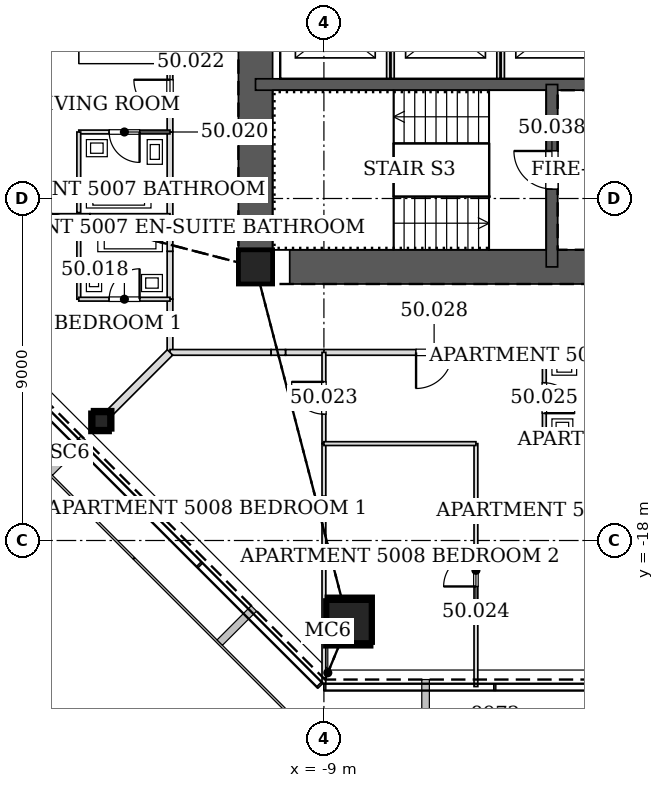
"""IFC4 building model, lengths in metres.
Left out: names, types, materials, properties, quantities, classifications, styles, units other than length and angle.
Written with IfcOpenShell. Run it as: python <this file> out.ifc"""

import sys

from ifc_helpers import new_model, si_unit, direction, frame, frame_2d, origin, origin_2d, place, context, subcontext, project, spatial, rectangle, hollow_rectangle, extrude, element, fill, save


model = new_model("IFC4")
c1 = context("Model", 3, precision=1e-05, world=origin(), true_north=direction((0.0, 1.0)))
c2 = subcontext(c1, "Body", "Model", "MODEL_VIEW")
j1 = project(units=[si_unit("LENGTHUNIT", "METRE"), si_unit("PLANEANGLEUNIT", "RADIAN")], contexts=[c1])
p1 = place(None, origin())
s1 = spatial("IfcSite", under=j1, at=p1, CompositionType="ELEMENT")
p2 = place(p1, origin())
s2 = spatial("IfcBuilding", under=s1, at=p2, CompositionType="ELEMENT")
p3 = place(p2, frame((0.0, 0.0, 217.6)))
s3 = spatial("IfcBuildingStorey", under=s2, at=p3, CompositionType="ELEMENT", Elevation=217.6)
p4 = place(p3, frame((-8.359, -20.181, 0.0), z_axis=(0.01169924247, 0.02827915051, 0.999531598986), x_axis=(-0.924045401938, 0.382282742426, 0.0)))
e1 = element("IfcColumn", 1, at=p4, inside=s3, PredefinedType="COLUMN", context=c2, shape_type="SweptSolid", body=[
    extrude(hollow_rectangle(XDim=1.2, YDim=1.2, WallThickness=0.055, at=origin_2d()), origin(), (0.0, 0.0, 1.0), 3.402),
])
p5 = place(p3, frame((-14.891, -14.891, 0.0), z_axis=(0.020026431307, 0.020026431307, 0.999598861593), x_axis=(-0.707106781187, 0.707106781187, 0.0)))
e2 = element("IfcColumn", 2, at=p5, inside=s3, PredefinedType="COLUMN", context=c2, shape_type="SweptSolid", body=[
    extrude(hollow_rectangle(XDim=0.5, YDim=0.5, WallThickness=0.025, at=origin_2d()), origin(), (0.0, 0.0, 1.0), 3.401),
])
p6 = place(p3, frame((-10.8, -10.8, 0.0), z_axis=(0.0, 0.0, 1.0), x_axis=(1.0, 0.0, 0.0)))
e3 = element("IfcColumn", 3, at=p6, inside=s3, PredefinedType="COLUMN", context=c2, shape_type="SweptSolid", body=[
    extrude(hollow_rectangle(XDim=0.9, YDim=0.9, WallThickness=0.05, at=origin_2d()), origin(), (0.0, 0.0, 1.0), 3.4),
])
p7 = place(p3, frame((-10.8, -10.8, 0.0), z_axis=(0.0, 0.0, 1.0), x_axis=(1.0, 0.0, 0.0)))
e4 = element("IfcWall", 4, at=p7, inside=s3, PredefinedType="SOLIDWALL", context=c2, shape_type="SweptSolid", body=[
    extrude(rectangle(XDim=21.6, YDim=0.9, at=frame_2d((10.8, 0.0))), origin(), (0.0, 0.0, 1.0), 3.4),
])
p8 = place(p7, frame((10.05, 0.0, 0.0)))
e5 = element("IfcOpeningElement", 5, at=p8, cuts=e4, PredefinedType="OPENING", context=c2, shape_type="SweptSolid", body=[
    extrude(rectangle(XDim=1.5, YDim=2.1, at=frame_2d((0.75, 1.05))), frame((0.0, 0.46, 0.0), z_axis=(0.0, -1.0, 0.0), x_axis=(1.0, 0.0, 0.0)), (0.0, 0.0, 1.0), 0.92),
])
p9 = place(p7, frame((17.1, 0.0, 0.0)))
e6 = element("IfcOpeningElement", 6, at=p9, cuts=e4, PredefinedType="OPENING", context=c2, shape_type="SweptSolid", body=[
    extrude(rectangle(XDim=0.9, YDim=2.1, at=frame_2d((0.45, 1.05))), frame((0.0, 0.46, 0.0), z_axis=(0.0, -1.0, 0.0), x_axis=(1.0, 0.0, 0.0)), (0.0, 0.0, 1.0), 0.92),
])
p10 = place(p3, frame((-10.8, 10.8, 0.0), z_axis=(0.0, 0.0, 1.0), x_axis=(0.0, -1.0, 0.0)))
e7 = element("IfcWall", 7, at=p10, inside=s3, PredefinedType="SOLIDWALL", context=c2, shape_type="SweptSolid", body=[
    extrude(rectangle(XDim=21.6, YDim=0.9, at=frame_2d((10.8, 0.0))), origin(), (0.0, 0.0, 1.0), 3.4),
])
p11 = place(p10, frame((8.7, 0.0, 0.0)))
e8 = element("IfcOpeningElement", 8, at=p11, cuts=e7, PredefinedType="OPENING", context=c2, shape_type="SweptSolid", body=[
    extrude(rectangle(XDim=1.2, YDim=2.1, at=frame_2d((0.6, 1.05))), frame((0.0, 0.46, 0.0), z_axis=(0.0, -1.0, 0.0), x_axis=(1.0, 0.0, 0.0)), (0.0, 0.0, 1.0), 0.92),
])
p12 = place(p10, frame((11.7, 0.0, 0.0)))
e9 = element("IfcOpeningElement", 9, at=p12, cuts=e7, PredefinedType="OPENING", context=c2, shape_type="SweptSolid", body=[
    extrude(rectangle(XDim=1.2, YDim=2.1, at=frame_2d((0.6, 1.05))), frame((0.0, 0.46, 0.0), z_axis=(0.0, -1.0, 0.0), x_axis=(1.0, 0.0, 0.0)), (0.0, 0.0, 1.0), 0.92),
])
p13 = place(p3, frame((-10.8, -6.0, 0.0), z_axis=(0.0, 0.0, 1.0), x_axis=(1.0, 0.0, 0.0)))
e10 = element("IfcWall", 10, at=p13, inside=s3, PredefinedType="SOLIDWALL", context=c2, shape_type="SweptSolid", body=[
    extrude(rectangle(XDim=21.6, YDim=0.3, at=frame_2d((10.8, 0.0))), origin(), (0.0, 0.0, 1.0), 3.4),
])
p14 = place(p13, frame((10.25, 0.0, 0.0)))
e11 = element("IfcOpeningElement", 11, at=p14, cuts=e10, PredefinedType="OPENING", context=c2, shape_type="SweptSolid", body=[
    extrude(rectangle(XDim=1.1, YDim=2.1, at=frame_2d((0.55, 1.05))), frame((0.0, 0.16, 0.0), z_axis=(0.0, -1.0, 0.0), x_axis=(1.0, 0.0, 0.0)), (0.0, 0.0, 1.0), 0.32),
])
p15 = place(p3, frame((-3.0, -6.0, 0.0), z_axis=(0.0, 0.0, 1.0), x_axis=(0.0, -1.0, 0.0)))
e12 = element("IfcWall", 12, at=p15, inside=s3, PredefinedType="SOLIDWALL", context=c2, shape_type="SweptSolid", body=[
    extrude(rectangle(XDim=4.8, YDim=0.3, at=frame_2d((2.4, 0.0))), origin(), (0.0, 0.0, 1.0), 3.4),
])
p16 = place(p15, frame((1.75, 0.0, 0.0)))
e13 = element("IfcOpeningElement", 13, at=p16, cuts=e12, PredefinedType="OPENING", context=c2, shape_type="SweptSolid", body=[
    extrude(rectangle(XDim=1.0, YDim=2.1, at=frame_2d((0.5, 1.05))), frame((0.0, 0.16, 0.0), z_axis=(0.0, -1.0, 0.0), x_axis=(1.0, 0.0, 0.0)), (0.0, 0.0, 1.0), 0.32),
])
p17 = place(p3, frame((-13.05, -9.449, 0.0), z_axis=(0.0, 0.0, 1.0), x_axis=(0.0, -1.0, 0.0)))
e14 = element("IfcWall", 14, at=p17, inside=s3, PredefinedType="PARTITIONING", context=c2, shape_type="SweptSolid", body=[
    extrude(rectangle(XDim=0.562, YDim=0.15, at=frame_2d((0.281, 0.0))), origin(), (0.0, 0.0, 1.0), 3.2),
])
p18 = place(p3, frame((-13.05, -10.389, 0.0), z_axis=(0.0, 0.0, 1.0), x_axis=(0.0, -1.0, 0.0)))
e15 = element("IfcWall", 15, at=p18, inside=s3, PredefinedType="PARTITIONING", context=c2, shape_type="SweptSolid", body=[
    extrude(rectangle(XDim=1.262, YDim=0.15, at=frame_2d((0.631, 0.0))), origin(), (0.0, 0.0, 1.0), 3.2),
])
p19 = place(p3, frame((-13.05, -10.011, 0.0), z_axis=(0.0, 0.0, 1.0), x_axis=(0.0, -1.0, 0.0)))
e16 = element("IfcWall", 16, at=p19, inside=s3, PredefinedType="PARTITIONING", context=c2, shape_type="SweptSolid", body=[
    extrude(rectangle(XDim=0.378, YDim=0.15, at=frame_2d((0.189, 0.0))), origin(), (0.0, 0.0, 1.0), 2.268),
])
p20 = place(p3, frame((-13.05, -11.649, 0.0), z_axis=(0.0, 0.0, 1.0), x_axis=(0.0, -1.0, 0.0)))
e17 = element("IfcWall", 17, at=p20, inside=s3, PredefinedType="PARTITIONING", context=c2, shape_type="SweptSolid", body=[
    extrude(rectangle(XDim=1.401, YDim=0.15, at=frame_2d((0.701, 0.0))), origin(), (0.0, 0.0, 1.0), 2.578),
])
p21 = place(p3, frame((-13.05, -7.249, 0.0), z_axis=(0.0, 0.0, 1.0), x_axis=(0.0, -1.0, 0.0)))
e18 = element("IfcWall", 18, at=p21, inside=s3, PredefinedType="PARTITIONING", context=c2, shape_type="SweptSolid", body=[
    extrude(rectangle(XDim=2.202, YDim=0.15, at=frame_2d((1.101, 0.0))), origin(), (0.0, 0.0, 1.0), 3.2),
])
p22 = place(p3, frame((-13.05, -3.649, 0.0), z_axis=(0.0, 0.0, 1.0), x_axis=(0.0, -1.0, 0.0)))
e19 = element("IfcWall", 19, at=p22, inside=s3, PredefinedType="PARTITIONING", context=c2, shape_type="SweptSolid", body=[
    extrude(rectangle(XDim=1.802, YDim=0.15, at=frame_2d((0.901, 0.0))), origin(), (0.0, 0.0, 1.0), 3.2),
])
p23 = place(p3, frame((-13.05, -5.449, 0.0), z_axis=(0.0, 0.0, 1.0), x_axis=(0.0, -1.0, 0.0)))
e20 = element("IfcWall", 20, at=p23, inside=s3, PredefinedType="PARTITIONING", context=c2, shape_type="SweptSolid", body=[
    extrude(rectangle(XDim=1.802, YDim=0.15, at=frame_2d((0.901, 0.0))), origin(), (0.0, 0.0, 1.0), 3.2),
])
p24 = place(p23, frame((0.426, 0.0, 0.0)))
e21 = element("IfcOpeningElement", 21, at=p24, cuts=e20, PredefinedType="OPENING", context=c2, shape_type="SweptSolid", body=[
    extrude(rectangle(XDim=0.95, YDim=2.1, at=frame_2d((0.475, 1.05))), frame((0.0, 0.085, 0.0), z_axis=(0.0, -1.0, 0.0), x_axis=(1.0, 0.0, 0.0)), (0.0, 0.0, 1.0), 0.17),
])
p25 = place(p3, frame((-13.05, -13.05, 0.0), z_axis=(0.0, 0.0, 1.0), x_axis=(1.0, 0.0, 0.0)))
e22 = element("IfcWall", 22, at=p25, inside=s3, PredefinedType="PARTITIONING", context=c2, shape_type="SweptSolid", body=[
    extrude(rectangle(XDim=2.661, YDim=0.15, at=frame_2d((1.331, 0.0))), origin(), (0.0, 0.0, 1.0), 2.578),
])
p26 = place(p3, frame((-10.011, -13.05, 0.0), z_axis=(0.0, 0.0, 1.0), x_axis=(1.0, 0.0, 0.0)))
e23 = element("IfcWall", 23, at=p26, inside=s3, PredefinedType="PARTITIONING", context=c2, shape_type="SweptSolid", body=[
    extrude(rectangle(XDim=1.012, YDim=0.15, at=frame_2d((0.506, 0.0))), origin(), (0.0, 0.0, 1.0), 3.2),
])
p27 = place(p3, frame((-10.389, -13.05, 0.0), z_axis=(0.0, 0.0, 1.0), x_axis=(1.0, 0.0, 0.0)))
e24 = element("IfcWall", 24, at=p27, inside=s3, PredefinedType="PARTITIONING", context=c2, shape_type="SweptSolid", body=[
    extrude(rectangle(XDim=0.378, YDim=0.15, at=frame_2d((0.189, 0.0))), origin(), (0.0, 0.0, 1.0), 2.268),
])
p28 = place(p3, frame((-3.201, -13.05, 0.0), z_axis=(0.0, 0.0, 1.0), x_axis=(1.0, 0.0, 0.0)))
e25 = element("IfcWall", 25, at=p28, inside=s3, PredefinedType="PARTITIONING", context=c2, shape_type="SweptSolid", body=[
    extrude(rectangle(XDim=2.202, YDim=0.15, at=frame_2d((1.101, 0.0))), origin(), (0.0, 0.0, 1.0), 3.2),
])
p29 = place(p3, frame((-9.001, -13.05, 0.0), z_axis=(0.0, 0.0, 1.0), x_axis=(1.0, 0.0, 0.0)))
e26 = element("IfcWall", 26, at=p29, inside=s3, PredefinedType="PARTITIONING", context=c2, shape_type="SweptSolid", body=[
    extrude(rectangle(XDim=5.802, YDim=0.15, at=frame_2d((2.901, 0.0))), origin(), (0.0, 0.0, 1.0), 3.2),
])
p30 = place(p29, frame((2.426, 0.0, 0.0)))
e27 = element("IfcOpeningElement", 27, at=p30, cuts=e26, PredefinedType="OPENING", context=c2, shape_type="SweptSolid", body=[
    extrude(rectangle(XDim=0.95, YDim=2.1, at=frame_2d((0.475, 1.05))), frame((0.0, 0.085, 0.0), z_axis=(0.0, -1.0, 0.0), x_axis=(1.0, 0.0, 0.0)), (0.0, 0.0, 1.0), 0.17),
])
p31 = place(p3, frame((-15.45, -9.748, 0.0), z_axis=(0.0, 0.0, 1.0), x_axis=(0.0, -1.0, 0.0)))
e28 = element("IfcWall", 28, at=p31, inside=s3, PredefinedType="PARTITIONING", context=c2, shape_type="SweptSolid", body=[
    extrude(rectangle(XDim=1.902, YDim=0.1, at=frame_2d((0.951, 0.0))), origin(), (0.0, 0.0, 1.0), 2.786),
])
p32 = place(p3, frame((-15.45, -9.45, 0.0), z_axis=(0.0, 0.0, 1.0), x_axis=(0.0, -1.0, 0.0)))
e29 = element("IfcWall", 29, at=p32, inside=s3, PredefinedType="PARTITIONING", context=c2, shape_type="SweptSolid", body=[
    extrude(rectangle(XDim=0.298, YDim=0.1, at=frame_2d((0.149, 0.0))), origin(), (0.0, 0.0, 1.0), 2.268),
])
p33 = place(p3, frame((-15.45, -11.65, 0.0), z_axis=(0.0, 0.0, 1.0), x_axis=(1.0, 0.0, 0.0)))
e30 = element("IfcWall", 30, at=p33, inside=s3, PredefinedType="PARTITIONING", context=c2, shape_type="SweptSolid", body=[
    extrude(rectangle(XDim=2.4, YDim=0.1, at=frame_2d((1.2, 0.0))), origin(), (0.0, 0.0, 1.0), 2.786),
])
p34 = place(p33, frame((0.8, 0.0, 0.0)))
e31 = element("IfcOpeningElement", 31, at=p34, cuts=e30, PredefinedType="OPENING", context=c2, shape_type="SweptSolid", body=[
    extrude(rectangle(XDim=0.8, YDim=2.1, at=frame_2d((0.4, 1.05))), frame((0.0, 0.06, 0.0), z_axis=(0.0, -1.0, 0.0), x_axis=(1.0, 0.0, 0.0)), (0.0, 0.0, 1.0), 0.12),
])
p35 = place(p3, frame((-13.05, -9.45, 0.0), z_axis=(0.0, 0.0, 1.0), x_axis=(-1.0, 0.0, 0.0)))
e32 = element("IfcWall", 32, at=p35, inside=s3, PredefinedType="PARTITIONING", context=c2, shape_type="SweptSolid", body=[
    extrude(rectangle(XDim=2.103, YDim=0.1, at=frame_2d((1.052, 0.0))), origin(), (0.0, 0.0, 1.0), 2.591),
])
p36 = place(p3, frame((-15.153, -9.45, 0.0), z_axis=(0.0, 0.0, 1.0), x_axis=(-1.0, 0.0, 0.0)))
e33 = element("IfcWall", 33, at=p36, inside=s3, PredefinedType="PARTITIONING", context=c2, shape_type="SweptSolid", body=[
    extrude(rectangle(XDim=1.415, YDim=0.1, at=frame_2d((0.708, 0.0))), origin(), (0.0, 0.0, 1.0), 2.268),
])
p37 = place(p3, frame((-14.633, -14.633, 0.0), z_axis=(0.0, 0.0, 1.0), x_axis=(0.707106781187, 0.707106781187, 0.0)))
e34 = element("IfcWall", 34, at=p37, inside=s3, PredefinedType="PARTITIONING", context=c2, shape_type="SweptSolid", body=[
    extrude(rectangle(XDim=2.238, YDim=0.2, at=frame_2d((1.119, 0.0))), origin(), (0.0, 0.0, 1.0), 2.578),
])
p38 = place(p3, frame((-13.05, -7.25, 0.0), z_axis=(0.0, 0.0, 1.0), x_axis=(-1.0, 0.0, 0.0)))
e35 = element("IfcWall", 35, at=p38, inside=s3, PredefinedType="PARTITIONING", context=c2, shape_type="SweptSolid", body=[
    extrude(rectangle(XDim=2.4, YDim=0.1, at=frame_2d((1.2, 0.0))), origin(), (0.0, 0.0, 1.0), 2.591),
])
p39 = place(p38, frame((0.8, 0.0, 0.0)))
e36 = element("IfcOpeningElement", 36, at=p39, cuts=e35, PredefinedType="OPENING", context=c2, shape_type="SweptSolid", body=[
    extrude(rectangle(XDim=0.8, YDim=2.1, at=frame_2d((0.4, 1.05))), frame((0.0, 0.06, 0.0), z_axis=(0.0, -1.0, 0.0), x_axis=(1.0, 0.0, 0.0)), (0.0, 0.0, 1.0), 0.12),
])
p40 = place(p3, frame((-15.45, -7.25, 0.0), z_axis=(0.0, 0.0, 1.0), x_axis=(0.0, -1.0, 0.0)))
e37 = element("IfcWall", 37, at=p40, inside=s3, PredefinedType="PARTITIONING", context=c2, shape_type="SweptSolid", body=[
    extrude(rectangle(XDim=2.121, YDim=0.1, at=frame_2d((1.061, 0.0))), origin(), (0.0, 0.0, 1.0), 3.2),
])
p41 = place(p3, frame((-9.0, -21.764, 0.0), z_axis=(0.0, 0.0, 1.0), x_axis=(0.0, 1.0, 0.0)))
e38 = element("IfcWall", 38, at=p41, inside=s3, PredefinedType="PARTITIONING", context=c2, shape_type="SweptSolid", body=[
    extrude(rectangle(XDim=1.178, YDim=0.1, at=frame_2d((0.589, 0.0))), origin(), (0.0, 0.0, 1.0), 3.2),
])
p42 = place(p3, frame((-9.0, -20.11, 0.0), z_axis=(0.0, 0.0, 1.0), x_axis=(0.0, 1.0, 0.0)))
e39 = element("IfcWall", 39, at=p42, inside=s3, PredefinedType="PARTITIONING", context=c2, shape_type="SweptSolid", body=[
    extrude(rectangle(XDim=1.855, YDim=0.1, at=frame_2d((0.927, 0.0))), origin(), (0.0, 0.0, 1.0), 2.783),
])
p43 = place(p3, frame((-9.0, -16.84, 0.0), z_axis=(0.0, 0.0, 1.0), x_axis=(0.0, 1.0, 0.0)))
e40 = element("IfcWall", 40, at=p43, inside=s3, PredefinedType="PARTITIONING", context=c2, shape_type="SweptSolid", body=[
    extrude(rectangle(XDim=1.391, YDim=0.1, at=frame_2d((0.696, 0.0))), origin(), (0.0, 0.0, 1.0), 2.664),
])
p44 = place(p3, frame((-9.0, -18.255, 0.0), z_axis=(0.0, 0.0, 1.0), x_axis=(0.0, 1.0, 0.0)))
e41 = element("IfcWall", 41, at=p44, inside=s3, PredefinedType="PARTITIONING", context=c2, shape_type="SweptSolid", body=[
    extrude(rectangle(XDim=1.415, YDim=0.1, at=frame_2d((0.708, 0.0))), origin(), (0.0, 0.0, 1.0), 2.268),
])
p45 = place(p3, frame((-9.0, -15.451, 0.0), z_axis=(0.0, 0.0, 1.0), x_axis=(0.0, 1.0, 0.0)))
e42 = element("IfcWall", 42, at=p45, inside=s3, PredefinedType="PARTITIONING", context=c2, shape_type="SweptSolid", body=[
    extrude(rectangle(XDim=2.401, YDim=0.1, at=frame_2d((1.2, 0.0))), origin(), (0.0, 0.0, 1.0), 2.591),
])
p46 = place(p45, frame((0.775, 0.0, 0.0)))
e43 = element("IfcOpeningElement", 43, at=p46, cuts=e42, PredefinedType="OPENING", context=c2, shape_type="SweptSolid", body=[
    extrude(rectangle(XDim=0.85, YDim=2.1, at=frame_2d((0.425, 1.05))), frame((0.0, 0.06, 0.0), z_axis=(0.0, -1.0, 0.0), x_axis=(1.0, 0.0, 0.0)), (0.0, 0.0, 1.0), 0.12),
])
p47 = place(p3, frame((-5.0, -21.843, 0.0), z_axis=(0.0, 0.0, 1.0), x_axis=(0.0, 1.0, 0.0)))
e44 = element("IfcWall", 44, at=p47, inside=s3, PredefinedType="PARTITIONING", context=c2, shape_type="SweptSolid", body=[
    extrude(rectangle(XDim=6.393, YDim=0.1, at=frame_2d((3.197, 0.0))), origin(), (0.0, 0.0, 1.0), 2.591),
])
p48 = place(p47, frame((2.634, 0.0, 0.0)))
e45 = element("IfcOpeningElement", 45, at=p48, cuts=e44, PredefinedType="OPENING", context=c2, shape_type="SweptSolid", body=[
    extrude(rectangle(XDim=0.85, YDim=2.1, at=frame_2d((0.425, 1.05))), frame((0.0, 0.06, 0.0), z_axis=(0.0, -1.0, 0.0), x_axis=(1.0, 0.0, 0.0)), (0.0, 0.0, 1.0), 0.12),
])
p49 = place(p3, frame((-5.0, -15.45, 0.0), z_axis=(0.0, 0.0, 1.0), x_axis=(-1.0, 0.0, 0.0)))
e46 = element("IfcWall", 46, at=p49, inside=s3, PredefinedType="PARTITIONING", context=c2, shape_type="SweptSolid", body=[
    extrude(rectangle(XDim=4.0, YDim=0.1, at=frame_2d((2.0, 0.0))), origin(), (0.0, 0.0, 1.0), 3.2),
])
p50 = place(p3, frame((-3.2, -13.05, 0.0), z_axis=(0.0, 0.0, 1.0), x_axis=(0.0, -1.0, 0.0)))
e47 = element("IfcWall", 47, at=p50, inside=s3, PredefinedType="PARTITIONING", context=c2, shape_type="SweptSolid", body=[
    extrude(rectangle(XDim=2.4, YDim=0.1, at=frame_2d((1.2, 0.0))), origin(), (0.0, 0.0, 1.0), 2.591),
])
p51 = place(p50, frame((0.8, 0.0, 0.0)))
e48 = element("IfcOpeningElement", 48, at=p51, cuts=e47, PredefinedType="OPENING", context=c2, shape_type="SweptSolid", body=[
    extrude(rectangle(XDim=0.8, YDim=2.1, at=frame_2d((0.4, 1.05))), frame((0.0, 0.06, 0.0), z_axis=(0.0, -1.0, 0.0), x_axis=(1.0, 0.0, 0.0)), (0.0, 0.0, 1.0), 0.12),
])
p52 = place(p3, frame((-3.2, -15.45, 0.0), z_axis=(0.0, 0.0, 1.0), x_axis=(1.0, 0.0, 0.0)))
e49 = element("IfcWall", 49, at=p52, inside=s3, PredefinedType="PARTITIONING", context=c2, shape_type="SweptSolid", body=[
    extrude(rectangle(XDim=2.2, YDim=0.1, at=frame_2d((1.1, 0.0))), origin(), (0.0, 0.0, 1.0), 3.2),
])
for number, where, z_axis, x_axis in (
    (50, (-7.25, -5.85, 0.0), (0.0, 0.0, 1.0), (0.0, 1.0, 0.0)),
    (51, (-4.35, -5.85, 0.0), (0.0, 0.0, 1.0), (0.0, 1.0, 0.0)),
):
    element("IfcWall", number, at=place(p3, frame(where, z_axis=z_axis, x_axis=x_axis)), inside=s3, PredefinedType="PARTITIONING", context=c2, shape_type="SweptSolid", body=[
        extrude(rectangle(XDim=2.7, YDim=0.2, at=frame_2d((1.35, 0.0))), origin(), (0.0, 0.0, 1.0), 3.4),
    ])
p53 = place(p34, origin())
e52 = element("IfcDoor", 52, at=p53, inside=s3, OperationType="SINGLE_SWING_RIGHT", PredefinedType="DOOR", context=c2, shape_type="SweptSolid", body=[
    extrude(rectangle(XDim=0.8, YDim=2.1, at=frame_2d((0.4, 1.05))), frame((0.0, 0.025, 0.0), z_axis=(0.0, -1.0, 0.0), x_axis=(1.0, 0.0, 0.0)), (0.0, 0.0, 1.0), 0.05),
])
fill(e31, e52)
p54 = place(p39, origin())
e53 = element("IfcDoor", 53, at=p54, inside=s3, OperationType="SINGLE_SWING_LEFT", PredefinedType="DOOR", context=c2, shape_type="SweptSolid", body=[
    extrude(rectangle(XDim=0.8, YDim=2.1, at=frame_2d((0.4, 1.05))), frame((0.0, 0.025, 0.0), z_axis=(0.0, -1.0, 0.0), x_axis=(1.0, 0.0, 0.0)), (0.0, 0.0, 1.0), 0.05),
])
fill(e36, e53)
p55 = place(p24, frame((0.95, 0.0, 0.0), z_axis=(0.0, 0.0, 1.0), x_axis=(-1.0, 0.0, 0.0)))
e54 = element("IfcDoor", 54, at=p55, inside=s3, OperationType="SINGLE_SWING_RIGHT", PredefinedType="DOOR", context=c2, shape_type="SweptSolid", body=[
    extrude(rectangle(XDim=0.95, YDim=2.1, at=frame_2d((0.475, 1.05))), frame((0.0, 0.025, 0.0), z_axis=(0.0, -1.0, 0.0), x_axis=(1.0, 0.0, 0.0)), (0.0, 0.0, 1.0), 0.05),
])
fill(e21, e54)
p56 = place(p46, origin())
e55 = element("IfcDoor", 55, at=p56, inside=s3, OperationType="SINGLE_SWING_RIGHT", PredefinedType="DOOR", context=c2, shape_type="SweptSolid", body=[
    extrude(rectangle(XDim=0.85, YDim=2.1, at=frame_2d((0.425, 1.05))), frame((0.0, 0.025, 0.0), z_axis=(0.0, -1.0, 0.0), x_axis=(1.0, 0.0, 0.0)), (0.0, 0.0, 1.0), 0.05),
])
fill(e43, e55)
p57 = place(p48, origin())
e56 = element("IfcDoor", 56, at=p57, inside=s3, OperationType="SINGLE_SWING_LEFT", PredefinedType="DOOR", context=c2, shape_type="SweptSolid", body=[
    extrude(rectangle(XDim=0.85, YDim=2.1, at=frame_2d((0.425, 1.05))), frame((0.0, 0.025, 0.0), z_axis=(0.0, -1.0, 0.0), x_axis=(1.0, 0.0, 0.0)), (0.0, 0.0, 1.0), 0.05),
])
fill(e45, e56)
p58 = place(p51, origin())
e57 = element("IfcDoor", 57, at=p58, inside=s3, OperationType="SINGLE_SWING_RIGHT", PredefinedType="DOOR", context=c2, shape_type="SweptSolid", body=[
    extrude(rectangle(XDim=0.8, YDim=2.1, at=frame_2d((0.4, 1.05))), frame((0.0, 0.025, 0.0), z_axis=(0.0, -1.0, 0.0), x_axis=(1.0, 0.0, 0.0)), (0.0, 0.0, 1.0), 0.05),
])
fill(e48, e57)
p59 = place(p30, frame((0.95, 0.0, 0.0), z_axis=(0.0, 0.0, 1.0), x_axis=(-1.0, 0.0, 0.0)))
e58 = element("IfcDoor", 58, at=p59, inside=s3, OperationType="SINGLE_SWING_RIGHT", PredefinedType="DOOR", context=c2, shape_type="SweptSolid", body=[
    extrude(rectangle(XDim=0.95, YDim=2.1, at=frame_2d((0.475, 1.05))), frame((0.0, 0.025, 0.0), z_axis=(0.0, -1.0, 0.0), x_axis=(1.0, 0.0, 0.0)), (0.0, 0.0, 1.0), 0.05),
])
fill(e27, e58)
p60 = place(p16, frame((1.0, 0.0, 0.0), z_axis=(0.0, 0.0, 1.0), x_axis=(-1.0, 0.0, 0.0)))
e59 = element("IfcDoor", 59, at=p60, inside=s3, OperationType="SINGLE_SWING_RIGHT", PredefinedType="DOOR", context=c2, shape_type="SweptSolid", body=[
    extrude(rectangle(XDim=1.0, YDim=2.1, at=frame_2d((0.5, 1.05))), frame((0.0, 0.025, 0.0), z_axis=(0.0, -1.0, 0.0), x_axis=(1.0, 0.0, 0.0)), (0.0, 0.0, 1.0), 0.05),
])
fill(e13, e59)
save(model, sys.argv[1])
